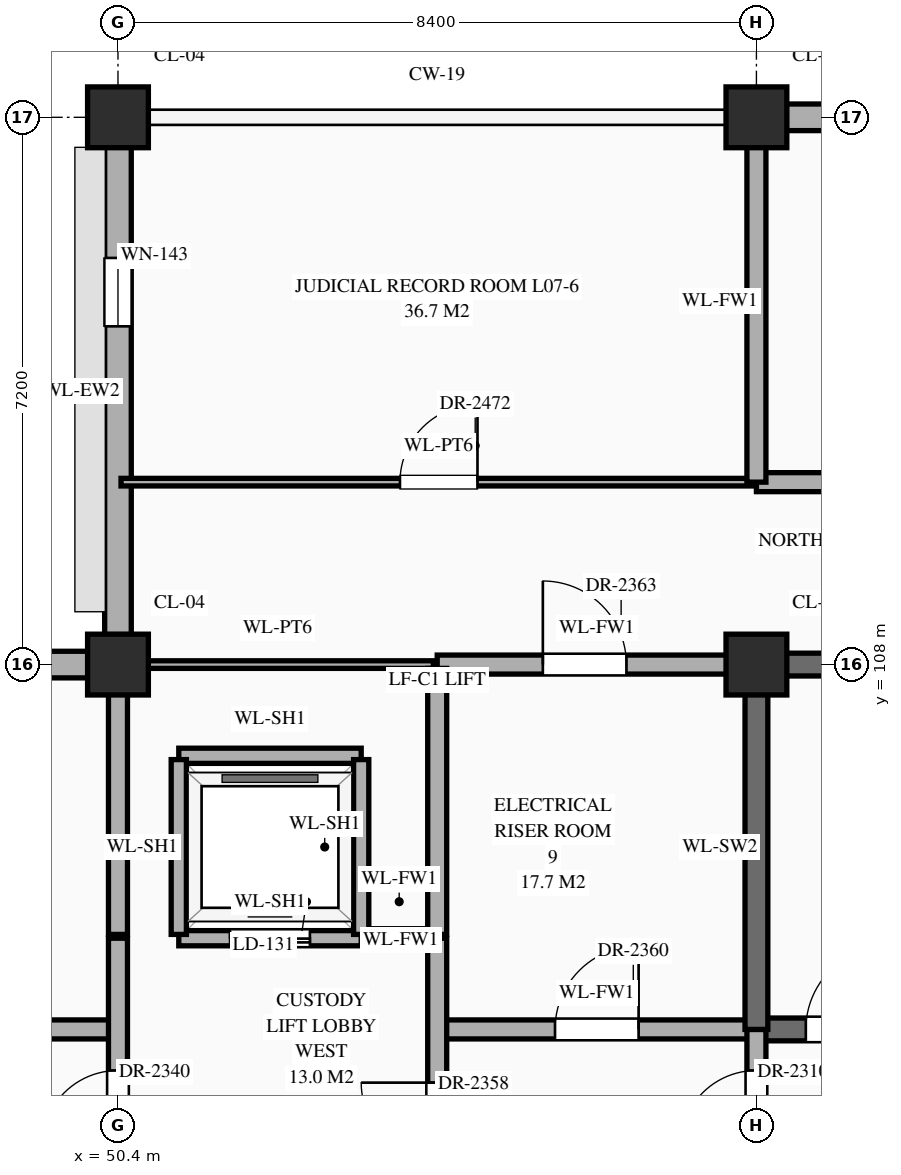
"""IFC4 building model, lengths in metres.
Left out: names, types, materials, properties, quantities, classifications, styles, units other than length and angle.
Written with IfcOpenShell. Run it as: python <this file> out.ifc"""

import sys

from ifc_helpers import new_model, si_unit, direction, frame, frame_2d, origin, origin_2d, place, context, subcontext, project, spatial, rectangle, extrude, element, fill, save


model = new_model("IFC4")
c1 = context("Model", 3, precision=1e-05, world=origin(), true_north=direction((0.0, 1.0)))
c2 = subcontext(c1, "Body", "Model", "MODEL_VIEW")
j1 = project(units=[si_unit("LENGTHUNIT", "METRE"), si_unit("PLANEANGLEUNIT", "RADIAN")], contexts=[c1])
p1 = place(None, origin())
s1 = spatial("IfcSite", under=j1, at=p1, CompositionType="ELEMENT")
p2 = place(p1, origin())
s2 = spatial("IfcBuilding", under=s1, at=p2, CompositionType="ELEMENT")
p3 = place(p2, frame((0.0, 0.0, 30.6)))
s3 = spatial("IfcBuildingStorey", under=s2, at=p3, CompositionType="ELEMENT", Elevation=30.6)
for number, where, z_axis, x_axis in (
    (1, (50.4, 108.0, 0.0), (0.0, 0.0, 1.0), (1.0, 0.0, 0.0)),
    (2, (50.4, 115.2, 0.0), (0.0, 0.0, 1.0), (1.0, 0.0, 0.0)),
    (3, (58.8, 108.0, 0.0), (0.0, 0.0, 1.0), (1.0, 0.0, 0.0)),
    (4, (58.8, 115.2, 0.0), (0.0, 0.0, 1.0), (1.0, 0.0, 0.0)),
):
    element("IfcColumn", number, at=place(p3, frame(where, z_axis=z_axis, x_axis=x_axis)), inside=s3, PredefinedType="COLUMN", context=c2, shape_type="SweptSolid", body=[
        extrude(rectangle(XDim=0.8, YDim=0.8, at=origin_2d()), origin(), (0.0, 0.0, 1.0), 4.5),
    ])
p4 = place(p3, frame((42.395, 108.0, 0.0), z_axis=(0.0, 0.0, 1.0), x_axis=(1.0, 0.0, 0.0)))
e5 = element("IfcWall", 5, at=p4, inside=s3, PredefinedType="STANDARD", context=c2, shape_type="SweptSolid", body=[
    extrude(rectangle(XDim=7.61, YDim=0.35, at=frame_2d((3.805, 0.0))), origin(), (0.0, 0.0, 1.0), 3.59),
])
p5 = place(p3, frame((50.4, 108.395, 0.0), z_axis=(0.0, 0.0, 1.0), x_axis=(0.0, 1.0, 0.0)))
e6 = element("IfcWall", 6, at=p5, inside=s3, PredefinedType="STANDARD", context=c2, shape_type="SweptSolid", body=[
    extrude(rectangle(XDim=6.41, YDim=0.35, at=frame_2d((3.205, 0.0))), origin(), (0.0, 0.0, 1.0), 3.59),
])
p6 = place(p5, frame((4.055, 0.0, 0.85)))
e7 = element("IfcOpeningElement", 7, at=p6, cuts=e6, PredefinedType="OPENING", context=c2, shape_type="SweptSolid", body=[
    extrude(rectangle(XDim=0.9, YDim=1.2, at=frame_2d((0.45, 0.6))), frame((0.0, 0.187, 0.0), z_axis=(0.0, -1.0, 0.0), x_axis=(1.0, 0.0, 0.0)), (0.0, 0.0, 1.0), 0.374),
])
p7 = place(p3, frame((59.195, 115.2, 0.0), z_axis=(0.0, 0.0, 1.0), x_axis=(1.0, 0.0, 0.0)))
e8 = element("IfcWall", 8, at=p7, inside=s3, PredefinedType="STANDARD", context=c2, shape_type="SweptSolid", body=[
    extrude(rectangle(XDim=7.61, YDim=0.35, at=frame_2d((3.805, 0.0))), origin(), (0.0, 0.0, 1.0), 3.59),
])
p8 = place(p3, frame((46.2, 103.2, 0.0), z_axis=(0.0, 0.0, 1.0), x_axis=(1.0, 0.0, 0.0)))
e9 = element("IfcWall", 9, at=p8, inside=s3, PredefinedType="STANDARD", context=c2, shape_type="SweptSolid", body=[
    extrude(rectangle(XDim=4.2, YDim=0.25, at=frame_2d((2.1, 0.0))), origin(), (0.0, 0.0, 1.0), 4.24),
])
p9 = place(p8, frame((1.55, 0.0, 0.0)))
e10 = element("IfcOpeningElement", 10, at=p9, cuts=e9, PredefinedType="OPENING", context=c2, shape_type="SweptSolid", body=[
    extrude(rectangle(XDim=1.1, YDim=2.2, at=frame_2d((0.55, 1.1))), frame((0.0, 0.137, 0.0), z_axis=(0.0, -1.0, 0.0), x_axis=(1.0, 0.0, 0.0)), (0.0, 0.0, 1.0), 0.274),
])
p10 = place(p3, frame((54.6, 103.2, 0.0), z_axis=(0.0, 0.0, 1.0), x_axis=(1.0, 0.0, 0.0)))
e11 = element("IfcWall", 11, at=p10, inside=s3, PredefinedType="STANDARD", context=c2, shape_type="SweptSolid", body=[
    extrude(rectangle(XDim=4.2, YDim=0.25, at=frame_2d((2.1, 0.0))), origin(), (0.0, 0.0, 1.0), 4.24),
])
p11 = place(p10, frame((1.55, 0.0, 0.0)))
e12 = element("IfcOpeningElement", 12, at=p11, cuts=e11, PredefinedType="OPENING", context=c2, shape_type="SweptSolid", body=[
    extrude(rectangle(XDim=1.1, YDim=2.2, at=frame_2d((0.55, 1.1))), frame((0.0, 0.137, 0.0), z_axis=(0.0, -1.0, 0.0), x_axis=(1.0, 0.0, 0.0)), (0.0, 0.0, 1.0), 0.274),
])
p12 = place(p3, frame((58.8, 103.2, 0.0), z_axis=(0.0, 0.0, 1.0), x_axis=(1.0, 0.0, 0.0)))
e13 = element("IfcWall", 13, at=p12, inside=s3, PredefinedType="SHEAR", context=c2, shape_type="SweptSolid", body=[
    extrude(rectangle(XDim=8.4, YDim=0.3, at=frame_2d((4.2, 0.0))), origin(), (0.0, 0.0, 1.0), 4.24),
])
p13 = place(p12, frame((0.65, 0.0, 0.0)))
e14 = element("IfcOpeningElement", 14, at=p13, cuts=e13, PredefinedType="OPENING", context=c2, shape_type="SweptSolid", body=[
    extrude(rectangle(XDim=1.1, YDim=2.2, at=frame_2d((0.55, 1.1))), frame((0.0, 0.162, 0.0), z_axis=(0.0, -1.0, 0.0), x_axis=(1.0, 0.0, 0.0)), (0.0, 0.0, 1.0), 0.324),
])
p14 = place(p3, frame((51.2, 104.4, 0.0), z_axis=(0.0, 0.0, 1.0), x_axis=(1.0, 0.0, 0.0)))
e15 = element("IfcWall", 15, at=p14, inside=s3, PredefinedType="STANDARD", context=c2, shape_type="SweptSolid", body=[
    extrude(rectangle(XDim=2.4, YDim=0.2, at=frame_2d((1.2, 0.0))), origin(), (0.0, 0.0, 1.0), 4.24),
])
p15 = place(p14, frame((0.675, 0.0, 0.0)))
e16 = element("IfcOpeningElement", 16, at=p15, cuts=e15, PredefinedType="OPENING", context=c2, shape_type="SweptSolid", body=[
    extrude(rectangle(XDim=1.05, YDim=2.15, at=frame_2d((0.525, 1.075))), frame((0.0, 0.112, 0.0), z_axis=(0.0, -1.0, 0.0), x_axis=(1.0, 0.0, 0.0)), (0.0, 0.0, 1.0), 0.224),
])
p16 = place(p3, frame((53.65, 104.4, 0.0), z_axis=(0.0, 0.0, 1.0), x_axis=(1.0, 0.0, 0.0)))
e17 = element("IfcWall", 17, at=p16, inside=s3, PredefinedType="STANDARD", context=c2, shape_type="SweptSolid", body=[
    extrude(rectangle(XDim=0.9, YDim=0.25, at=frame_2d((0.45, 0.0))), origin(), (0.0, 0.0, 1.0), 4.24),
])
p17 = place(p3, frame((51.2, 106.8, 0.0), z_axis=(0.0, 0.0, 1.0), x_axis=(1.0, 0.0, 0.0)))
e18 = element("IfcWall", 18, at=p17, inside=s3, PredefinedType="STANDARD", context=c2, shape_type="SweptSolid", body=[
    extrude(rectangle(XDim=2.4, YDim=0.2, at=frame_2d((1.2, 0.0))), origin(), (0.0, 0.0, 1.0), 4.24),
])
p18 = place(p3, frame((50.45, 108.0, 0.0), z_axis=(0.0, 0.0, 1.0), x_axis=(1.0, 0.0, 0.0)))
e19 = element("IfcWall", 19, at=p18, inside=s3, PredefinedType="STANDARD", context=c2, shape_type="SweptSolid", body=[
    extrude(rectangle(XDim=4.1, YDim=0.1, at=frame_2d((2.05, 0.0))), origin(), (0.0, 0.0, 1.0), 3.39),
])
p19 = place(p3, frame((54.6, 108.0, 0.0), z_axis=(0.0, 0.0, 1.0), x_axis=(1.0, 0.0, 0.0)))
e20 = element("IfcWall", 20, at=p19, inside=s3, PredefinedType="STANDARD", context=c2, shape_type="SweptSolid", body=[
    extrude(rectangle(XDim=4.2, YDim=0.25, at=frame_2d((2.1, 0.0))), origin(), (0.0, 0.0, 1.0), 3.39),
])
p20 = place(p19, frame((1.39, 0.0, 0.0)))
e21 = element("IfcOpeningElement", 21, at=p20, cuts=e20, PredefinedType="OPENING", context=c2, shape_type="SweptSolid", body=[
    extrude(rectangle(XDim=1.1, YDim=2.2, at=frame_2d((0.55, 1.1))), frame((0.0, 0.137, 0.0), z_axis=(0.0, -1.0, 0.0), x_axis=(1.0, 0.0, 0.0)), (0.0, 0.0, 1.0), 0.274),
])
p21 = place(p3, frame((58.8, 108.0, 0.0), z_axis=(0.0, 0.0, 1.0), x_axis=(1.0, 0.0, 0.0)))
e22 = element("IfcWall", 22, at=p21, inside=s3, PredefinedType="SHEAR", context=c2, shape_type="SweptSolid", body=[
    extrude(rectangle(XDim=8.4, YDim=0.3, at=frame_2d((4.2, 0.0))), origin(), (0.0, 0.0, 1.0), 4.24),
])
p22 = place(p3, frame((50.44, 110.4, 0.0), z_axis=(0.0, 0.0, 1.0), x_axis=(1.0, 0.0, 0.0)))
e23 = element("IfcWall", 23, at=p22, inside=s3, PredefinedType="STANDARD", context=c2, shape_type="SweptSolid", body=[
    extrude(rectangle(XDim=8.36, YDim=0.1, at=frame_2d((4.18, 0.0))), origin(), (0.0, 0.0, 1.0), 4.24),
])
p23 = place(p22, frame((3.67, 0.0, 0.0)))
e24 = element("IfcOpeningElement", 24, at=p23, cuts=e23, PredefinedType="OPENING", context=c2, shape_type="SweptSolid", body=[
    extrude(rectangle(XDim=1.02, YDim=2.4, at=frame_2d((0.51, 1.2))), frame((0.0, 0.062, 0.0), z_axis=(0.0, -1.0, 0.0), x_axis=(1.0, 0.0, 0.0)), (0.0, 0.0, 1.0), 0.124),
])
p24 = place(p3, frame((58.8, 110.4, 0.0), z_axis=(0.0, 0.0, 1.0), x_axis=(1.0, 0.0, 0.0)))
e25 = element("IfcWall", 25, at=p24, inside=s3, PredefinedType="STANDARD", context=c2, shape_type="SweptSolid", body=[
    extrude(rectangle(XDim=8.4, YDim=0.25, at=frame_2d((4.2, 0.0))), origin(), (0.0, 0.0, 1.0), 4.24),
])
p25 = place(p24, frame((3.725, 0.0, 0.0)))
e26 = element("IfcOpeningElement", 26, at=p25, cuts=e25, PredefinedType="OPENING", context=c2, shape_type="SweptSolid", body=[
    extrude(rectangle(XDim=0.95, YDim=2.15, at=frame_2d((0.475, 1.075))), frame((0.0, 0.137, 0.0), z_axis=(0.0, -1.0, 0.0), x_axis=(1.0, 0.0, 0.0)), (0.0, 0.0, 1.0), 0.274),
])
p26 = place(p3, frame((50.4, 91.2, 0.0), z_axis=(0.0, 0.0, 1.0), x_axis=(0.0, 1.0, 0.0)))
e27 = element("IfcWall", 27, at=p26, inside=s3, PredefinedType="STANDARD", context=c2, shape_type="SweptSolid", body=[
    extrude(rectangle(XDim=13.2, YDim=0.25, at=frame_2d((6.6, 0.0))), origin(), (0.0, 0.0, 1.0), 3.49),
])
p27 = place(p26, frame((0.565, 0.0, 0.0)))
e28 = element("IfcOpeningElement", 28, at=p27, cuts=e27, PredefinedType="OPENING", context=c2, shape_type="SweptSolid", body=[
    extrude(rectangle(XDim=0.95, YDim=2.15, at=frame_2d((0.475, 1.075))), frame((0.0, 0.137, 0.0), z_axis=(0.0, -1.0, 0.0), x_axis=(1.0, 0.0, 0.0)), (0.0, 0.0, 1.0), 0.274),
])
p28 = place(p26, frame((10.46, 0.0, 0.0)))
e29 = element("IfcOpeningElement", 29, at=p28, cuts=e27, PredefinedType="OPENING", context=c2, shape_type="SweptSolid", body=[
    extrude(rectangle(XDim=1.0, YDim=2.2, at=frame_2d((0.5, 1.1))), frame((0.0, 0.137, 0.0), z_axis=(0.0, -1.0, 0.0), x_axis=(1.0, 0.0, 0.0)), (0.0, 0.0, 1.0), 0.274),
])
p29 = place(p26, frame((3.21, 0.0, 0.0)))
e30 = element("IfcOpeningElement", 30, at=p29, cuts=e27, PredefinedType="OPENING", context=c2, shape_type="SweptSolid", body=[
    extrude(rectangle(XDim=1.1, YDim=2.2, at=frame_2d((0.55, 1.1))), frame((0.0, 0.137, 0.0), z_axis=(0.0, -1.0, 0.0), x_axis=(1.0, 0.0, 0.0)), (0.0, 0.0, 1.0), 0.274),
])
p30 = place(p3, frame((50.4, 104.45, 0.0), z_axis=(0.0, 0.0, 1.0), x_axis=(0.0, 1.0, 0.0)))
e31 = element("IfcWall", 31, at=p30, inside=s3, PredefinedType="STANDARD", context=c2, shape_type="SweptSolid", body=[
    extrude(rectangle(XDim=3.46, YDim=0.25, at=frame_2d((1.73, 0.0))), origin(), (0.0, 0.0, 1.0), 3.49),
])
for number, where, z_axis, x_axis in (
    (32, (51.2, 104.45, 0.0), (0.0, 0.0, 1.0), (0.0, 1.0, 0.0)),
    (33, (53.6, 104.45, 0.0), (0.0, 0.0, 1.0), (0.0, 1.0, 0.0)),
):
    element("IfcWall", number, at=place(p3, frame(where, z_axis=z_axis, x_axis=x_axis)), inside=s3, PredefinedType="STANDARD", context=c2, shape_type="SweptSolid", body=[
        extrude(rectangle(XDim=2.3, YDim=0.2, at=frame_2d((1.15, 0.0))), origin(), (0.0, 0.0, 1.0), 4.24),
    ])
p31 = place(p3, frame((54.6, 100.8, 0.0), z_axis=(0.0, 0.0, 1.0), x_axis=(0.0, 1.0, 0.0)))
e34 = element("IfcWall", 34, at=p31, inside=s3, PredefinedType="STANDARD", context=c2, shape_type="SweptSolid", body=[
    extrude(rectangle(XDim=3.6, YDim=0.25, at=frame_2d((1.8, 0.0))), origin(), (0.0, 0.0, 1.0), 3.94),
])
p32 = place(p31, frame((0.7, 0.0, 0.0)))
e35 = element("IfcOpeningElement", 35, at=p32, cuts=e34, PredefinedType="OPENING", context=c2, shape_type="SweptSolid", body=[
    extrude(rectangle(XDim=1.0, YDim=2.2, at=frame_2d((0.5, 1.1))), frame((0.0, 0.137, 0.0), z_axis=(0.0, -1.0, 0.0), x_axis=(1.0, 0.0, 0.0)), (0.0, 0.0, 1.0), 0.274),
])
p33 = place(p3, frame((54.6, 104.45, 0.0), z_axis=(0.0, 0.0, 1.0), x_axis=(0.0, 1.0, 0.0)))
e36 = element("IfcWall", 36, at=p33, inside=s3, PredefinedType="STANDARD", context=c2, shape_type="SweptSolid", body=[
    extrude(rectangle(XDim=3.5, YDim=0.25, at=frame_2d((1.75, 0.0))), origin(), (0.0, 0.0, 1.0), 3.94),
])
p34 = place(p3, frame((58.8, 100.8, 0.0), z_axis=(0.0, 0.0, 1.0), x_axis=(0.0, 1.0, 0.0)))
e37 = element("IfcWall", 37, at=p34, inside=s3, PredefinedType="STANDARD", context=c2, shape_type="SweptSolid", body=[
    extrude(rectangle(XDim=2.4, YDim=0.25, at=frame_2d((1.2, 0.0))), origin(), (0.0, 0.0, 1.0), 3.49),
])
p35 = place(p34, frame((0.86, 0.0, 0.0)))
e38 = element("IfcOpeningElement", 38, at=p35, cuts=e37, PredefinedType="OPENING", context=c2, shape_type="SweptSolid", body=[
    extrude(rectangle(XDim=1.0, YDim=2.2, at=frame_2d((0.5, 1.1))), frame((0.0, 0.137, 0.0), z_axis=(0.0, -1.0, 0.0), x_axis=(1.0, 0.0, 0.0)), (0.0, 0.0, 1.0), 0.274),
])
p36 = place(p3, frame((58.8, 103.2, 0.0), z_axis=(0.0, 0.0, 1.0), x_axis=(0.0, 1.0, 0.0)))
e39 = element("IfcWall", 39, at=p36, inside=s3, PredefinedType="SHEAR", context=c2, shape_type="SweptSolid", body=[
    extrude(rectangle(XDim=4.8, YDim=0.3, at=frame_2d((2.4, 0.0))), origin(), (0.0, 0.0, 1.0), 4.24),
])
p37 = place(p3, frame((58.8, 110.4, 0.0), z_axis=(0.0, 0.0, 1.0), x_axis=(0.0, 1.0, 0.0)))
e40 = element("IfcWall", 40, at=p37, inside=s3, PredefinedType="STANDARD", context=c2, shape_type="SweptSolid", body=[
    extrude(rectangle(XDim=4.76, YDim=0.25, at=frame_2d((2.38, 0.0))), origin(), (0.0, 0.0, 1.0), 3.49),
])
p38 = place(p6, origin())
e41 = element("IfcWindow", 41, at=p38, inside=s3, PartitioningType="SINGLE_PANEL", PredefinedType="WINDOW", context=c2, shape_type="SweptSolid", body=[
    extrude(rectangle(XDim=0.9, YDim=1.2, at=frame_2d((0.45, 0.6))), frame((0.0, 0.03, 0.0), z_axis=(0.0, -1.0, 0.0), x_axis=(1.0, 0.0, 0.0)), (0.0, 0.0, 1.0), 0.06),
])
fill(e7, e41)
p39 = place(p15, origin())
e42 = element("IfcDoor", 42, at=p39, inside=s3, OperationType="DOUBLE_DOOR_SLIDING", PredefinedType="DOOR", context=c2, shape_type="SweptSolid", body=[
    extrude(rectangle(XDim=1.05, YDim=2.15, at=frame_2d((0.525, 1.075))), frame((0.0, 0.025, 0.0), z_axis=(0.0, -1.0, 0.0), x_axis=(1.0, 0.0, 0.0)), (0.0, 0.0, 1.0), 0.05),
])
fill(e16, e42)
p40 = place(p13, origin())
e43 = element("IfcDoor", 43, at=p40, inside=s3, OperationType="SINGLE_SWING_RIGHT", PredefinedType="DOOR", context=c2, shape_type="SweptSolid", body=[
    extrude(rectangle(XDim=1.1, YDim=2.2, at=frame_2d((0.55, 1.1))), frame((0.0, 0.025, 0.0), z_axis=(0.0, -1.0, 0.0), x_axis=(1.0, 0.0, 0.0)), (0.0, 0.0, 1.0), 0.05),
])
fill(e14, e43)
p41 = place(p35, origin())
e44 = element("IfcDoor", 44, at=p41, inside=s3, OperationType="SINGLE_SWING_LEFT", PredefinedType="DOOR", context=c2, shape_type="SweptSolid", body=[
    extrude(rectangle(XDim=1.0, YDim=2.2, at=frame_2d((0.5, 1.1))), frame((0.0, 0.025, 0.0), z_axis=(0.0, -1.0, 0.0), x_axis=(1.0, 0.0, 0.0)), (0.0, 0.0, 1.0), 0.05),
])
fill(e38, e44)
p42 = place(p28, origin())
e45 = element("IfcDoor", 45, at=p42, inside=s3, OperationType="SINGLE_SWING_LEFT", PredefinedType="DOOR", context=c2, shape_type="SweptSolid", body=[
    extrude(rectangle(XDim=1.0, YDim=2.2, at=frame_2d((0.5, 1.1))), frame((0.0, 0.025, 0.0), z_axis=(0.0, -1.0, 0.0), x_axis=(1.0, 0.0, 0.0)), (0.0, 0.0, 1.0), 0.05),
])
fill(e29, e45)
p43 = place(p32, origin())
e46 = element("IfcDoor", 46, at=p43, inside=s3, OperationType="SINGLE_SWING_RIGHT", PredefinedType="DOOR", context=c2, shape_type="SweptSolid", body=[
    extrude(rectangle(XDim=1.0, YDim=2.2, at=frame_2d((0.5, 1.1))), frame((0.0, 0.025, 0.0), z_axis=(0.0, -1.0, 0.0), x_axis=(1.0, 0.0, 0.0)), (0.0, 0.0, 1.0), 0.05),
])
fill(e35, e46)
p44 = place(p11, origin())
e47 = element("IfcDoor", 47, at=p44, inside=s3, OperationType="SINGLE_SWING_RIGHT", PredefinedType="DOOR", context=c2, shape_type="SweptSolid", body=[
    extrude(rectangle(XDim=1.1, YDim=2.2, at=frame_2d((0.55, 1.1))), frame((0.0, 0.025, 0.0), z_axis=(0.0, -1.0, 0.0), x_axis=(1.0, 0.0, 0.0)), (0.0, 0.0, 1.0), 0.05),
])
fill(e12, e47)
p45 = place(p20, origin())
e48 = element("IfcDoor", 48, at=p45, inside=s3, OperationType="SINGLE_SWING_LEFT", PredefinedType="DOOR", context=c2, shape_type="SweptSolid", body=[
    extrude(rectangle(XDim=1.1, YDim=2.2, at=frame_2d((0.55, 1.1))), frame((0.0, 0.025, 0.0), z_axis=(0.0, -1.0, 0.0), x_axis=(1.0, 0.0, 0.0)), (0.0, 0.0, 1.0), 0.05),
])
fill(e21, e48)
p46 = place(p23, origin())
e49 = element("IfcDoor", 49, at=p46, inside=s3, OperationType="SINGLE_SWING_RIGHT", PredefinedType="DOOR", context=c2, shape_type="SweptSolid", body=[
    extrude(rectangle(XDim=1.02, YDim=2.4, at=frame_2d((0.51, 1.2))), frame((0.0, 0.025, 0.0), z_axis=(0.0, -1.0, 0.0), x_axis=(1.0, 0.0, 0.0)), (0.0, 0.0, 1.0), 0.05),
])
fill(e24, e49)
save(model, sys.argv[1])
